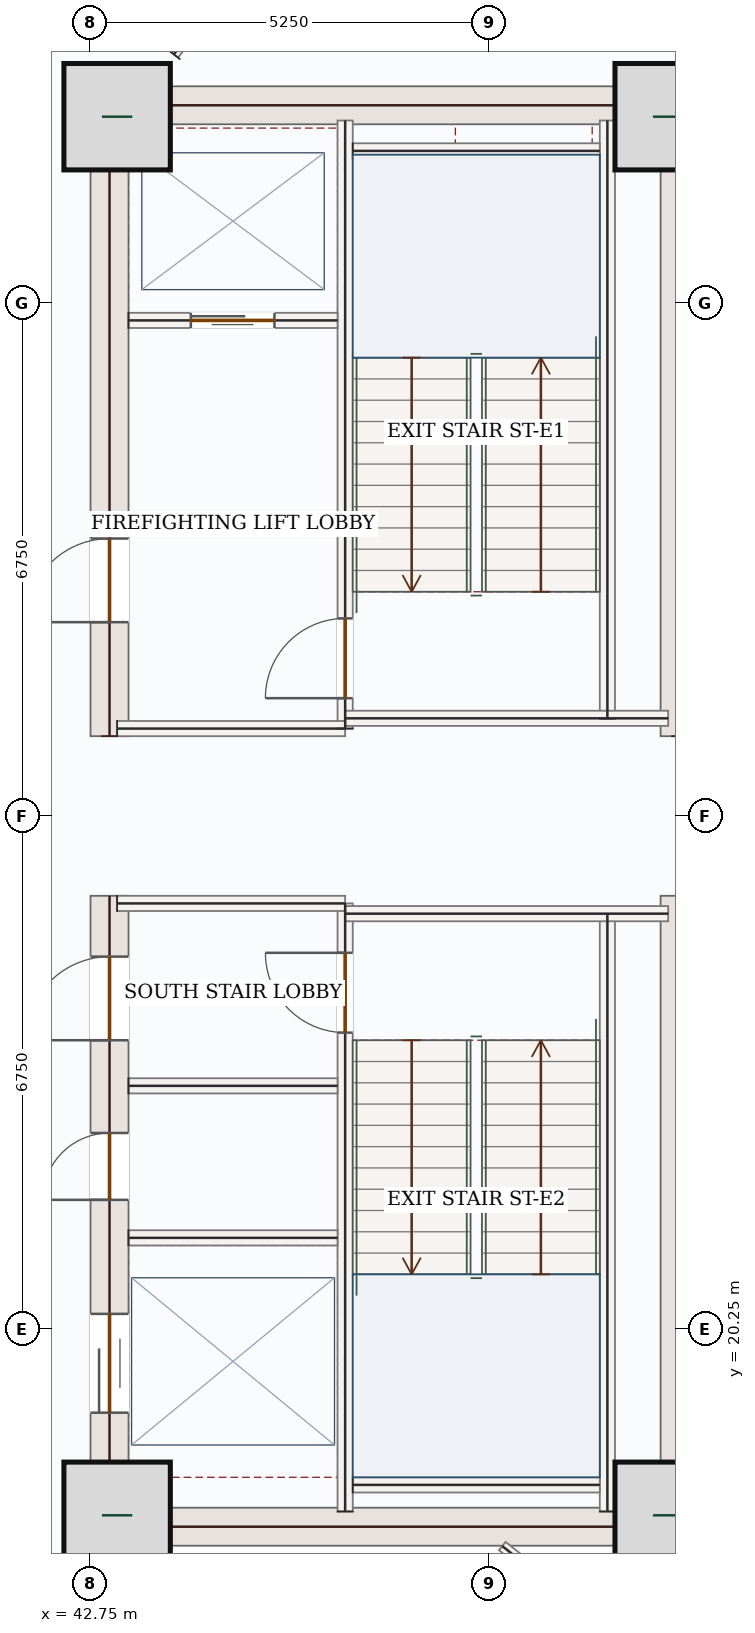
"""IFC4 building model, lengths in metres.
Left out: names, types, materials, properties, quantities, classifications, styles, units other than length and angle.
Written with IfcOpenShell. Run it as: python <this file> out.ifc"""

import sys

from ifc_helpers import new_model, si_unit, direction, frame, frame_2d, origin, origin_2d, place, context, subcontext, project, spatial, rectangle, extrude, source, transform, mapped, element, fill, save


model = new_model("IFC4")
c1 = context("Model", 3, precision=1e-05, world=origin(), true_north=direction((0.0, 1.0)))
c2 = subcontext(c1, "Body", "Model", "MODEL_VIEW")
j1 = project(units=[si_unit("LENGTHUNIT", "METRE"), si_unit("PLANEANGLEUNIT", "RADIAN")], contexts=[c1])
p1 = place(None, origin())
s1 = spatial("IfcSite", under=j1, at=p1, CompositionType="ELEMENT")
p2 = place(p1, origin())
s2 = spatial("IfcBuilding", under=s1, at=p2, CompositionType="ELEMENT")
p3 = place(p2, frame((0.0, 0.0, 104.7)))
s3 = spatial("IfcBuildingStorey", under=s2, at=p3, CompositionType="ELEMENT", Elevation=104.7)
p4 = place(p3, frame((43.0, 17.4, 0.0), z_axis=(0.0, 0.0, 1.0), x_axis=(0.0, 1.0, 0.0)))
e1 = element("IfcWall", 1, at=p4, inside=s3, PredefinedType="SHEAR", context=c2, shape_type="SweptSolid", body=[
    extrude(rectangle(XDim=8.55, YDim=0.5, at=frame_2d((4.275, 0.0))), origin(), (0.0, 0.0, 1.0), 3.95),
])
p5 = place(p4, frame((6.65, 0.0, 0.0)))
e2 = element("IfcOpeningElement", 2, at=p5, cuts=e1, PredefinedType="OPENING", context=c2, shape_type="SweptSolid", body=[
    extrude(rectangle(XDim=1.1, YDim=2.2, at=frame_2d((0.55, 1.1))), frame((0.0, 0.26, 0.0), z_axis=(0.0, -1.0, 0.0), x_axis=(1.0, 0.0, 0.0)), (0.0, 0.0, 1.0), 0.52),
])
p6 = place(p4, frame((1.75, 0.0, 0.0)))
e3 = element("IfcOpeningElement", 3, at=p6, cuts=e1, PredefinedType="OPENING", context=c2, shape_type="SweptSolid", body=[
    extrude(rectangle(XDim=1.3, YDim=2.2, at=frame_2d((0.65, 1.1))), frame((0.0, 0.26, 0.0), z_axis=(0.0, -1.0, 0.0), x_axis=(1.0, 0.0, 0.0)), (0.0, 0.0, 1.0), 0.52),
])
p7 = place(p4, frame((4.55, 0.0, 0.0)))
e4 = element("IfcOpeningElement", 4, at=p7, cuts=e1, PredefinedType="OPENING", context=c2, shape_type="SweptSolid", body=[
    extrude(rectangle(XDim=0.88, YDim=2.1, at=frame_2d((0.44, 1.05))), frame((0.0, 0.26, 0.0), z_axis=(0.0, -1.0, 0.0), x_axis=(1.0, 0.0, 0.0)), (0.0, 0.0, 1.0), 0.52),
])
p8 = place(p3, frame((43.0, 28.05, 0.0), z_axis=(0.0, 0.0, 1.0), x_axis=(0.0, 1.0, 0.0)))
e5 = element("IfcWall", 5, at=p8, inside=s3, PredefinedType="SHEAR", context=c2, shape_type="SweptSolid", body=[
    extrude(rectangle(XDim=8.55, YDim=0.5, at=frame_2d((4.275, 0.0))), origin(), (0.0, 0.0, 1.0), 3.95),
])
p9 = place(p8, frame((1.5, 0.0, 0.0)))
e6 = element("IfcOpeningElement", 6, at=p9, cuts=e5, PredefinedType="OPENING", context=c2, shape_type="SweptSolid", body=[
    extrude(rectangle(XDim=1.1, YDim=2.2, at=frame_2d((0.55, 1.1))), frame((0.0, 0.26, 0.0), z_axis=(0.0, -1.0, 0.0), x_axis=(1.0, 0.0, 0.0)), (0.0, 0.0, 1.0), 0.52),
])
m1 = source(origin(), c2, "Body", "SweptSolid", [
    extrude(rectangle(XDim=8.55, YDim=0.5, at=frame_2d((4.275, 0.0))), origin(), (0.0, 0.0, 1.0), 3.95),
])
for number, where, z_axis, x_axis in (
    (7, (50.5, 17.4, 0.0), (0.0, 0.0, 1.0), (0.0, 1.0, 0.0)),
    (8, (50.5, 28.05, 0.0), (0.0, 0.0, 1.0), (0.0, 1.0, 0.0)),
):
    element("IfcWall", number, at=place(p3, frame(where, z_axis=z_axis, x_axis=x_axis)), inside=s3, PredefinedType="SHEAR", context=c2, shape_type="MappedRepresentation", body=[
        mapped(m1, transform((0.0, 0.0, 0.0), x_axis=(1.0, 0.0, 0.0), y_axis=(0.0, 1.0, 0.0), z_axis=(0.0, 0.0, 1.0), scale=1.0)),
    ])
m2 = source(origin(), c2, "Body", "SweptSolid", [
    extrude(rectangle(XDim=7.0, YDim=0.5, at=frame_2d((3.5, 0.0))), origin(), (0.0, 0.0, 1.0), 3.95),
])
for number, where, z_axis, x_axis in (
    (9, (43.25, 17.65, 0.0), (0.0, 0.0, 1.0), (1.0, 0.0, 0.0)),
    (10, (43.25, 36.35, 0.0), (0.0, 0.0, 1.0), (1.0, 0.0, 0.0)),
):
    element("IfcWall", number, at=place(p3, frame(where, z_axis=z_axis, x_axis=x_axis)), inside=s3, PredefinedType="SHEAR", context=c2, shape_type="MappedRepresentation", body=[
        mapped(m2, transform((0.0, 0.0, 0.0), x_axis=(1.0, 0.0, 0.0), y_axis=(0.0, 1.0, 0.0), z_axis=(0.0, 0.0, 1.0), scale=1.0)),
    ])
m3 = source(origin(), c2, "Body", "SweptSolid", [
    extrude(rectangle(XDim=1.4, YDim=1.4, at=origin_2d()), origin(), (0.0, 0.0, 1.0), 4.2),
])
for number, where, z_axis, x_axis in (
    (11, (43.1, 17.8, 0.0), (0.0, 0.0, 1.0), (1.0, 0.0, 0.0)),
    (12, (50.35, 17.8, 0.0), (0.0, 0.0, 1.0), (1.0, 0.0, 0.0)),
    (13, (43.1, 36.2, 0.0), (0.0, 0.0, 1.0), (1.0, 0.0, 0.0)),
    (14, (50.35, 36.2, 0.0), (0.0, 0.0, 1.0), (1.0, 0.0, 0.0)),
):
    element("IfcColumn", number, at=place(p3, frame(where, z_axis=z_axis, x_axis=x_axis)), inside=s3, PredefinedType="COLUMN", context=c2, shape_type="MappedRepresentation", body=[
        mapped(m3, transform((0.0, 0.0, 0.0), x_axis=(1.0, 0.0, 0.0), y_axis=(0.0, 1.0, 0.0), z_axis=(0.0, 0.0, 1.0), scale=1.0)),
    ])
p10 = place(p3, frame((53.06, 18.458, 0.0), z_axis=(0.0, 0.0, 1.0), x_axis=(-0.707106781187, -0.707106781187, 0.0)))
e15 = element("IfcWall", 15, at=p10, inside=s3, PredefinedType="SOLIDWALL", context=c2, shape_type="SweptSolid", body=[
    extrude(rectangle(XDim=5.258, YDim=0.32, at=frame_2d((2.629, 0.0))), origin(), (0.0, 0.0, 1.0), 3.95),
])
p11 = place(p10, frame((1.429, 0.0, 0.85)))
e16 = element("IfcOpeningElement", 16, at=p11, cuts=e15, PredefinedType="OPENING", context=c2, shape_type="SweptSolid", body=[
    extrude(rectangle(XDim=2.4, YDim=1.8, at=frame_2d((1.2, 0.9))), frame((0.0, 0.17, 0.0), z_axis=(0.0, -1.0, 0.0), x_axis=(1.0, 0.0, 0.0)), (0.0, 0.0, 1.0), 0.34),
])
m4 = source(origin(), c2, "Body", "SweptSolid", [
    extrude(rectangle(XDim=4.99, YDim=0.32, at=frame_2d((2.495, 0.0))), origin(), (0.0, 0.0, 1.0), 3.95),
])
p12 = place(p3, frame((49.342, 39.26, 0.0), z_axis=(0.0, 0.0, 1.0), x_axis=(0.707106781187, -0.707106781187, 0.0)))
e17 = element("IfcWall", 17, at=p12, inside=s3, PredefinedType="SOLIDWALL", context=c2, shape_type="MappedRepresentation", body=[
    mapped(m4, transform((0.0, 0.0, 0.0), x_axis=(1.0, 0.0, 0.0), y_axis=(0.0, 1.0, 0.0), z_axis=(0.0, 0.0, 1.0), scale=1.0)),
])
m5 = source(origin(), c2, "Body", "SweptSolid", [
    extrude(rectangle(XDim=7.87, YDim=0.2, at=frame_2d((3.935, 0.0))), origin(), (0.0, 0.0, 1.0), 3.95),
])
for number, where, z_axis, x_axis in (
    (18, (49.55, 17.85, 0.0), (0.0, 0.0, 1.0), (0.0, 1.0, 0.0)),
    (19, (49.55, 28.28, 0.0), (0.0, 0.0, 1.0), (0.0, 1.0, 0.0)),
):
    element("IfcWall", number, at=place(p3, frame(where, z_axis=z_axis, x_axis=x_axis)), inside=s3, PredefinedType="SOLIDWALL", context=c2, shape_type="MappedRepresentation", body=[
        mapped(m5, transform((0.0, 0.0, 0.0), x_axis=(1.0, 0.0, 0.0), y_axis=(0.0, 1.0, 0.0), z_axis=(0.0, 0.0, 1.0), scale=1.0)),
    ])
p13 = place(p3, frame((46.1, 17.85, 0.0), z_axis=(0.0, 0.0, 1.0), x_axis=(0.0, 1.0, 0.0)))
e20 = element("IfcWall", 20, at=p13, inside=s3, PredefinedType="SOLIDWALL", context=c2, shape_type="SweptSolid", body=[
    extrude(rectangle(XDim=8.0, YDim=0.2, at=frame_2d((4.0, 0.0))), origin(), (0.0, 0.0, 1.0), 3.95),
])
p14 = place(p13, frame((6.3, 0.0, 0.0)))
e21 = element("IfcOpeningElement", 21, at=p14, cuts=e20, PredefinedType="OPENING", context=c2, shape_type="SweptSolid", body=[
    extrude(rectangle(XDim=1.05, YDim=2.15, at=frame_2d((0.525, 1.075))), frame((0.0, 0.11, 0.0), z_axis=(0.0, -1.0, 0.0), x_axis=(1.0, 0.0, 0.0)), (0.0, 0.0, 1.0), 0.22),
])
p15 = place(p3, frame((46.1, 28.15, 0.0), z_axis=(0.0, 0.0, 1.0), x_axis=(0.0, 1.0, 0.0)))
e22 = element("IfcWall", 22, at=p15, inside=s3, PredefinedType="SOLIDWALL", context=c2, shape_type="SweptSolid", body=[
    extrude(rectangle(XDim=8.0, YDim=0.2, at=frame_2d((4.0, 0.0))), origin(), (0.0, 0.0, 1.0), 3.95),
])
p16 = place(p15, frame((0.4, 0.0, 0.0)))
e23 = element("IfcOpeningElement", 23, at=p16, cuts=e22, PredefinedType="OPENING", context=c2, shape_type="SweptSolid", body=[
    extrude(rectangle(XDim=1.05, YDim=2.15, at=frame_2d((0.525, 1.075))), frame((0.0, 0.11, 0.0), z_axis=(0.0, -1.0, 0.0), x_axis=(1.0, 0.0, 0.0)), (0.0, 0.0, 1.0), 0.22),
])
m6 = source(origin(), c2, "Body", "SweptSolid", [
    extrude(rectangle(XDim=3.0, YDim=0.2, at=frame_2d((1.5, 0.0))), origin(), (0.0, 0.0, 1.0), 3.95),
])
p17 = place(p3, frame((43.1, 25.85, 0.0), z_axis=(0.0, 0.0, 1.0), x_axis=(1.0, 0.0, 0.0)))
e24 = element("IfcWall", 24, at=p17, inside=s3, PredefinedType="SOLIDWALL", context=c2, shape_type="MappedRepresentation", body=[
    mapped(m6, transform((0.0, 0.0, 0.0), x_axis=(1.0, 0.0, 0.0), y_axis=(0.0, 1.0, 0.0), z_axis=(0.0, 0.0, 1.0), scale=1.0)),
])
m7 = source(origin(), c2, "Body", "SweptSolid", [
    extrude(rectangle(XDim=4.25, YDim=0.2, at=frame_2d((2.125, 0.0))), origin(), (0.0, 0.0, 1.0), 3.95),
])
p18 = place(p3, frame((46.1, 25.715, 0.0), z_axis=(0.0, 0.0, 1.0), x_axis=(1.0, 0.0, 0.0)))
e25 = element("IfcWall", 25, at=p18, inside=s3, PredefinedType="SOLIDWALL", context=c2, shape_type="MappedRepresentation", body=[
    mapped(m7, transform((0.0, 0.0, 0.0), x_axis=(1.0, 0.0, 0.0), y_axis=(0.0, 1.0, 0.0), z_axis=(0.0, 0.0, 1.0), scale=1.0)),
])
p19 = place(p3, frame((43.1, 28.15, 0.0), z_axis=(0.0, 0.0, 1.0), x_axis=(1.0, 0.0, 0.0)))
e26 = element("IfcWall", 26, at=p19, inside=s3, PredefinedType="SOLIDWALL", context=c2, shape_type="MappedRepresentation", body=[
    mapped(m6, transform((0.0, 0.0, 0.0), x_axis=(1.0, 0.0, 0.0), y_axis=(0.0, 1.0, 0.0), z_axis=(0.0, 0.0, 1.0), scale=1.0)),
])
p20 = place(p3, frame((46.1, 28.285, 0.0), z_axis=(0.0, 0.0, 1.0), x_axis=(1.0, 0.0, 0.0)))
e27 = element("IfcWall", 27, at=p20, inside=s3, PredefinedType="SOLIDWALL", context=c2, shape_type="MappedRepresentation", body=[
    mapped(m7, transform((0.0, 0.0, 0.0), x_axis=(1.0, 0.0, 0.0), y_axis=(0.0, 1.0, 0.0), z_axis=(0.0, 0.0, 1.0), scale=1.0)),
])
m8 = source(origin(), c2, "Body", "SweptSolid", [
    extrude(rectangle(XDim=3.25, YDim=0.2, at=frame_2d((1.625, 0.0))), origin(), (0.0, 0.0, 1.0), 3.95),
])
for number, where, z_axis, x_axis in (
    (28, (46.2, 35.75, 0.0), (0.0, 0.0, 1.0), (1.0, 0.0, 0.0)),
    (29, (46.2, 18.2, 0.0), (0.0, 0.0, 1.0), (1.0, 0.0, 0.0)),
):
    element("IfcWall", number, at=place(p3, frame(where, z_axis=z_axis, x_axis=x_axis)), inside=s3, PredefinedType="SOLIDWALL", context=c2, shape_type="MappedRepresentation", body=[
        mapped(m8, transform((0.0, 0.0, 0.0), x_axis=(1.0, 0.0, 0.0), y_axis=(0.0, 1.0, 0.0), z_axis=(0.0, 0.0, 1.0), scale=1.0)),
    ])
p21 = place(p3, frame((43.25, 33.52, 0.0), z_axis=(0.0, 0.0, 1.0), x_axis=(1.0, 0.0, 0.0)))
e30 = element("IfcWall", 30, at=p21, inside=s3, PredefinedType="SOLIDWALL", context=c2, shape_type="SweptSolid", body=[
    extrude(rectangle(XDim=2.75, YDim=0.2, at=frame_2d((1.375, 0.0))), origin(), (0.0, 0.0, 1.0), 3.95),
])
p22 = place(p21, frame((0.82, 0.0, 0.0)))
e31 = element("IfcOpeningElement", 31, at=p22, cuts=e30, PredefinedType="OPENING", context=c2, shape_type="SweptSolid", body=[
    extrude(rectangle(XDim=1.1, YDim=2.15, at=frame_2d((0.55, 1.075))), frame((0.0, 0.11, 0.0), z_axis=(0.0, -1.0, 0.0), x_axis=(1.0, 0.0, 0.0)), (0.0, 0.0, 1.0), 0.22),
])
m9 = source(origin(), c2, "Body", "SweptSolid", [
    extrude(rectangle(XDim=2.75, YDim=0.2, at=frame_2d((1.375, 0.0))), origin(), (0.0, 0.0, 1.0), 3.95),
])
for number, where, z_axis, x_axis in (
    (32, (43.25, 23.45, 0.0), (0.0, 0.0, 1.0), (1.0, 0.0, 0.0)),
    (33, (43.25, 21.45, 0.0), (0.0, 0.0, 1.0), (1.0, 0.0, 0.0)),
):
    element("IfcWall", number, at=place(p3, frame(where, z_axis=z_axis, x_axis=x_axis)), inside=s3, PredefinedType="SOLIDWALL", context=c2, shape_type="MappedRepresentation", body=[
        mapped(m9, transform((0.0, 0.0, 0.0), x_axis=(1.0, 0.0, 0.0), y_axis=(0.0, 1.0, 0.0), z_axis=(0.0, 0.0, 1.0), scale=1.0)),
    ])
m10 = source(origin(), c2, "Body", "SweptSolid", [
    extrude(rectangle(XDim=2.56, YDim=0.14, at=frame_2d((1.28, 0.0))), origin(), (0.0, 0.0, 1.0), 3.95),
])
p23 = place(p3, frame((50.173, 15.804, 0.0), z_axis=(0.0, 0.0, 1.0), x_axis=(-0.783347138409, 0.621584475954, 0.0)))
e34 = element("IfcWall", 34, at=p23, inside=s3, PredefinedType="PARTITIONING", context=c2, shape_type="MappedRepresentation", body=[
    mapped(m10, transform((0.0, 0.0, 0.0), x_axis=(1.0, 0.0, 0.0), y_axis=(0.0, 1.0, 0.0), z_axis=(0.0, 0.0, 1.0), scale=1.0)),
])
m11 = source(origin(), c2, "Body", "SweptSolid", [
    extrude(rectangle(XDim=2.629, YDim=0.14, at=frame_2d((1.315, 0.0))), origin(), (0.0, 0.0, 1.0), 3.95),
])
p24 = place(p3, frame((43.846, 37.02, 0.0), z_axis=(0.0, 0.0, 1.0), x_axis=(0.614210560268, 0.789142184689, 0.0)))
e35 = element("IfcWall", 35, at=p24, inside=s3, PredefinedType="PARTITIONING", context=c2, shape_type="MappedRepresentation", body=[
    mapped(m11, transform((0.0, 0.0, 0.0), x_axis=(1.0, 0.0, 0.0), y_axis=(0.0, 1.0, 0.0), z_axis=(0.0, 0.0, 1.0), scale=1.0)),
])
m12 = source(origin(), c2, "Body", "SweptSolid", [
    extrude(rectangle(XDim=2.4, YDim=1.8, at=frame_2d((1.2, 0.9))), frame((0.0, 0.03, 0.0), z_axis=(0.0, -1.0, 0.0), x_axis=(1.0, 0.0, 0.0)), (0.0, 0.0, 1.0), 0.06),
])
p25 = place(p11, origin())
e36 = element("IfcWindow", 36, at=p25, inside=s3, PartitioningType="DOUBLE_PANEL_VERTICAL", PredefinedType="WINDOW", context=c2, shape_type="MappedRepresentation", body=[
    mapped(m12, transform((0.0, 0.0, 0.0), x_axis=(1.0, 0.0, 0.0), y_axis=(0.0, 1.0, 0.0), z_axis=(0.0, 0.0, 1.0), scale=1.0)),
])
fill(e16, e36)
m13 = source(origin(), c2, "Body", "SweptSolid", [
    extrude(rectangle(XDim=1.05, YDim=2.15, at=frame_2d((0.525, 1.075))), frame((0.0, 0.025, 0.0), z_axis=(0.0, -1.0, 0.0), x_axis=(1.0, 0.0, 0.0)), (0.0, 0.0, 1.0), 0.05),
])
p26 = place(p16, origin())
e37 = element("IfcDoor", 37, at=p26, inside=s3, OperationType="SINGLE_SWING_LEFT", PredefinedType="DOOR", context=c2, shape_type="MappedRepresentation", body=[
    mapped(m13, transform((0.0, 0.0, 0.0), x_axis=(1.0, 0.0, 0.0), y_axis=(0.0, 1.0, 0.0), z_axis=(0.0, 0.0, 1.0), scale=1.0)),
])
fill(e23, e37)
p27 = place(p14, origin())
e38 = element("IfcDoor", 38, at=p27, inside=s3, OperationType="SINGLE_SWING_RIGHT", PredefinedType="DOOR", context=c2, shape_type="MappedRepresentation", body=[
    mapped(m13, transform((0.0, 0.0, 0.0), x_axis=(1.0, 0.0, 0.0), y_axis=(0.0, 1.0, 0.0), z_axis=(0.0, 0.0, 1.0), scale=1.0)),
])
fill(e21, e38)
m14 = source(origin(), c2, "Body", "SweptSolid", [
    extrude(rectangle(XDim=1.1, YDim=2.15, at=frame_2d((0.55, 1.075))), frame((0.0, 0.025, 0.0), z_axis=(0.0, -1.0, 0.0), x_axis=(1.0, 0.0, 0.0)), (0.0, 0.0, 1.0), 0.05),
])
p28 = place(p22, origin())
e39 = element("IfcDoor", 39, at=p28, inside=s3, OperationType="DOUBLE_DOOR_SLIDING", PredefinedType="DOOR", context=c2, shape_type="MappedRepresentation", body=[
    mapped(m14, transform((0.0, 0.0, 0.0), x_axis=(1.0, 0.0, 0.0), y_axis=(0.0, 1.0, 0.0), z_axis=(0.0, 0.0, 1.0), scale=1.0)),
])
fill(e31, e39)
m15 = source(origin(), c2, "Body", "SweptSolid", [
    extrude(rectangle(XDim=1.1, YDim=2.2, at=frame_2d((0.55, 1.1))), frame((0.0, 0.025, 0.0), z_axis=(0.0, -1.0, 0.0), x_axis=(1.0, 0.0, 0.0)), (0.0, 0.0, 1.0), 0.05),
])
p29 = place(p9, origin())
e40 = element("IfcDoor", 40, at=p29, inside=s3, OperationType="SINGLE_SWING_LEFT", PredefinedType="DOOR", context=c2, shape_type="MappedRepresentation", body=[
    mapped(m15, transform((0.0, 0.0, 0.0), x_axis=(1.0, 0.0, 0.0), y_axis=(0.0, 1.0, 0.0), z_axis=(0.0, 0.0, 1.0), scale=1.0)),
])
fill(e6, e40)
p30 = place(p5, origin())
e41 = element("IfcDoor", 41, at=p30, inside=s3, OperationType="SINGLE_SWING_LEFT", PredefinedType="DOOR", context=c2, shape_type="MappedRepresentation", body=[
    mapped(m15, transform((0.0, 0.0, 0.0), x_axis=(1.0, 0.0, 0.0), y_axis=(0.0, 1.0, 0.0), z_axis=(0.0, 0.0, 1.0), scale=1.0)),
])
fill(e2, e41)
m16 = source(origin(), c2, "Body", "SweptSolid", [
    extrude(rectangle(XDim=1.3, YDim=2.2, at=frame_2d((0.65, 1.1))), frame((0.0, 0.025, 0.0), z_axis=(0.0, -1.0, 0.0), x_axis=(1.0, 0.0, 0.0)), (0.0, 0.0, 1.0), 0.05),
])
p31 = place(p6, origin())
e42 = element("IfcDoor", 42, at=p31, inside=s3, OperationType="DOUBLE_DOOR_SLIDING", PredefinedType="DOOR", context=c2, shape_type="MappedRepresentation", body=[
    mapped(m16, transform((0.0, 0.0, 0.0), x_axis=(1.0, 0.0, 0.0), y_axis=(0.0, 1.0, 0.0), z_axis=(0.0, 0.0, 1.0), scale=1.0)),
])
fill(e3, e42)
m17 = source(origin(), c2, "Body", "SweptSolid", [
    extrude(rectangle(XDim=0.88, YDim=2.1, at=frame_2d((0.44, 1.05))), frame((0.0, 0.025, 0.0), z_axis=(0.0, -1.0, 0.0), x_axis=(1.0, 0.0, 0.0)), (0.0, 0.0, 1.0), 0.05),
])
p32 = place(p7, origin())
e43 = element("IfcDoor", 43, at=p32, inside=s3, OperationType="SINGLE_SWING_LEFT", PredefinedType="DOOR", context=c2, shape_type="MappedRepresentation", body=[
    mapped(m17, transform((0.0, 0.0, 0.0), x_axis=(1.0, 0.0, 0.0), y_axis=(0.0, 1.0, 0.0), z_axis=(0.0, 0.0, 1.0), scale=1.0)),
])
fill(e4, e43)
save(model, sys.argv[1])
